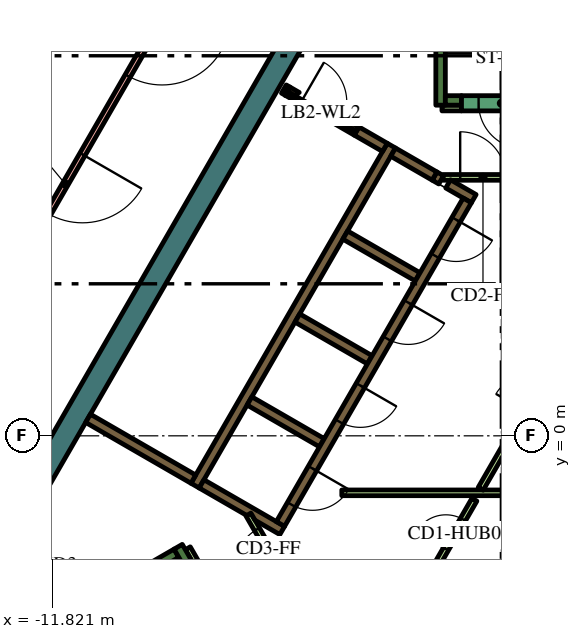
"""IFC4 building model, lengths in metres.
Left out: names, types, materials, properties, quantities, classifications, styles, units other than length and angle.
Written with IfcOpenShell. Run it as: python <this file> out.ifc"""

import sys

from ifc_helpers import new_model, si_unit, direction, frame, frame_2d, origin, place, context, subcontext, project, spatial, polyline, rectangle, outline, extrude, element, fill, save


model = new_model("IFC4")
c1 = context("Model", 3, precision=1e-05, world=origin(), true_north=direction((0.0, 1.0)))
c2 = subcontext(c1, "Body", "Model", "MODEL_VIEW")
j1 = project(units=[si_unit("LENGTHUNIT", "METRE"), si_unit("PLANEANGLEUNIT", "RADIAN")], contexts=[c1])
p1 = place(None, origin())
s1 = spatial("IfcSite", under=j1, at=p1, CompositionType="ELEMENT")
p2 = place(p1, origin())
s2 = spatial("IfcBuilding", under=s1, at=p2, CompositionType="ELEMENT")
p3 = place(p2, frame((0.0, 0.0, 321.6)))
s3 = spatial("IfcBuildingStorey", under=s2, at=p3, CompositionType="ELEMENT", Elevation=321.6)
p4 = place(p3, frame((-4.652, 11.842, 0.0), z_axis=(0.0, 0.0, 1.0), x_axis=(-0.500003640647, -0.866023301845, 0.0)))
e1 = element("IfcWall", 1, at=p4, inside=s3, PredefinedType="SOLIDWALL", context=c2, shape_type="SweptSolid", body=[
    extrude(rectangle(XDim=15.858, YDim=0.6, at=frame_2d((7.929, 0.0))), origin(), (0.0, 0.0, 1.0), 6.0),
])
p5 = place(p3, frame((-1.6, 8.7, 0.0), z_axis=(0.0, 0.0, 1.0), x_axis=(0.0, 1.0, 0.0)))
e2 = element("IfcWall", 2, at=p5, inside=s3, PredefinedType="SOLIDWALL", context=c2, shape_type="SweptSolid", body=[
    extrude(rectangle(XDim=7.05, YDim=0.25, at=frame_2d((3.525, 0.0))), origin(), (0.0, 0.0, 1.0), 6.0),
])
p6 = place(p3, frame((-1.475, 8.825, 0.0), z_axis=(0.0, 0.0, 1.0), x_axis=(1.0, 0.0, 0.0)))
e3 = element("IfcWall", 3, at=p6, inside=s3, PredefinedType="SOLIDWALL", context=c2, shape_type="SweptSolid", body=[
    extrude(rectangle(XDim=0.425, YDim=0.25, at=frame_2d((0.212, 0.0))), origin(), (0.0, 0.0, 1.0), 6.0),
])
p7 = place(p3, frame((-14.44, -6.49, 0.0), z_axis=(0.0, 0.0, 1.0), x_axis=(0.866022966069, 0.500004222222, 0.0)))
e4 = element("IfcWall", 4, at=p7, inside=s3, PredefinedType="SOLIDWALL", context=c2, shape_type="SweptSolid", body=[
    extrude(rectangle(XDim=6.8, YDim=0.25, at=frame_2d((3.4, 0.0))), origin(), (0.0, 0.0, 1.0), 6.0),
])
p8 = place(p3, frame((-8.168, -3.503, 0.0), z_axis=(0.0, 0.0, 1.0), x_axis=(-0.499952099219, 0.866053057547, 0.0)))
e5 = element("IfcWall", 5, at=p8, inside=s3, PredefinedType="SOLIDWALL", context=c2, shape_type="SweptSolid", body=[
    extrude(rectangle(XDim=0.675, YDim=0.25, at=frame_2d((0.337, 0.0))), origin(), (0.0, 0.0, 1.0), 6.0),
])
p9 = place(p3, frame((-8.06, -1.311, 0.0), z_axis=(0.0, 0.0, 1.0), x_axis=(0.50000273126, 0.866023826885, 0.0)))
e6 = element("IfcWall", 6, at=p9, inside=s3, PredefinedType="SOLIDWALL", context=c2, shape_type="SweptSolid", body=[
    extrude(rectangle(XDim=10.33, YDim=0.25, at=frame_2d((5.165, 0.0))), origin(), (0.0, 0.0, 1.0), 6.0),
])
p10 = place(p3, frame((-1.758, 6.835, 0.0), z_axis=(0.0, 0.0, 1.0), x_axis=(0.865982457891, -0.500074377092, 0.0)))
e7 = element("IfcWall", 7, at=p10, inside=s3, PredefinedType="SOLIDWALL", context=c2, shape_type="SweptSolid", body=[
    extrude(rectangle(XDim=0.2, YDim=0.25, at=frame_2d((0.1, 0.0))), origin(), (0.0, 0.0, 1.0), 6.0),
])
p11 = place(p3, frame((-1.76, 6.836, 0.0), z_axis=(0.0, 0.0, 1.0), x_axis=(-0.865952863304, 0.500125622755, 0.0)))
e8 = element("IfcWall", 8, at=p11, inside=s3, PredefinedType="SOLIDWALL", context=c2, shape_type="SweptSolid", body=[
    extrude(rectangle(XDim=1.258, YDim=0.25, at=frame_2d((0.629, 0.0))), origin(), (0.0, 0.0, 1.0), 6.0),
])
p12 = place(p3, frame((-0.728, 6.24, 0.0), z_axis=(0.0, 0.0, 1.0), x_axis=(-0.865955664968, 0.500120771724, 0.0)))
e9 = element("IfcWall", 9, at=p12, inside=s3, PredefinedType="SOLIDWALL", context=c2, shape_type="SweptSolid", body=[
    extrude(rectangle(XDim=0.778, YDim=0.25, at=frame_2d((0.389, 0.0))), origin(), (0.0, 0.0, 1.0), 6.0),
])
for number, where, z_axis, x_axis in (
    (10, (-2.204, 4.182, 0.0), (0.0, 0.0, 1.0), (-0.866, 0.5, 0.0)),
    (11, (-5.369, 3.1, 0.0), (0.0, 0.0, 1.0), (0.866, -0.5, 0.0)),
    (12, (-4.724, -0.182, 0.0), (0.0, 0.0, 1.0), (-0.866, 0.5, 0.0)),
):
    element("IfcWall", number, at=place(p3, frame(where, z_axis=z_axis, x_axis=x_axis)), inside=s3, PredefinedType="SOLIDWALL", context=c2, shape_type="SweptSolid", body=[
        extrude(rectangle(XDim=2.2, YDim=0.25, at=frame_2d((1.1, 0.0))), origin(), (0.0, 0.0, 1.0), 6.0),
    ])
p13 = place(p3, origin())
e13 = element("IfcWall", 13, at=p13, inside=s3, PredefinedType="SOLIDWALL", context=c2, shape_type="SweptSolid", body=[
    extrude(outline(polyline([(-5.922, -2.257), (-5.922, -2.257), (-5.705, -2.382), (-5.83, -2.598), (-6.483, -2.221), (-6.591, -2.033), (-6.591, -2.033), (-6.7, -2.096), (-7.952, -1.373), (-7.827, -1.156), (-5.922, -2.257)])), origin(), (0.0, 0.0, 1.0), 6.0),
])
p14 = place(p3, frame((-8.106, -1.14, 0.0), z_axis=(0.0, 0.0, 1.0), x_axis=(-0.866008981251, 0.500028443584, 0.0)))
e14 = element("IfcWall", 14, at=p14, inside=s3, PredefinedType="SOLIDWALL", context=c2, shape_type="SweptSolid", body=[
    extrude(rectangle(XDim=3.2, YDim=0.25, at=frame_2d((1.6, 0.0))), origin(), (0.0, 0.0, 1.0), 6.0),
])
p15 = place(p3, frame((-5.725, 9.125, 0.0), z_axis=(0.0, 0.0, 1.0), x_axis=(0.866185586049, -0.49972245349, 0.0)))
e15 = element("IfcWall", 15, at=p15, inside=s3, PredefinedType="SOLIDWALL", context=c2, shape_type="SweptSolid", body=[
    extrude(rectangle(XDim=0.11, YDim=0.25, at=frame_2d((0.055, 0.0))), origin(), (0.0, 0.0, 1.0), 6.0),
])
p16 = place(p3, frame((-3.066, 7.59, 0.0), z_axis=(0.0, 0.0, 1.0), x_axis=(-0.866081358704, 0.49990307071, 0.0)))
e16 = element("IfcWall", 16, at=p16, inside=s3, PredefinedType="SOLIDWALL", context=c2, shape_type="SweptSolid", body=[
    extrude(rectangle(XDim=0.858, YDim=0.25, at=frame_2d((0.429, 0.0))), origin(), (0.0, 0.0, 1.0), 6.0),
])
e17 = element("IfcWall", 17, at=p13, inside=s3, PredefinedType="SOLIDWALL", context=c2, shape_type="SweptSolid", body=[
    extrude(outline(polyline([(-3.748, 8.128), (-3.813, 8.015), (-4.027, 8.139), (-4.017, 8.156), (-4.008, 8.173), (-4.0, 8.192), (-3.995, 8.21), (-3.991, 8.23), (-3.99, 8.25), (-3.99, 8.268), (-3.748, 8.128)])), origin(), (0.0, 0.0, 1.0), 6.0),
])
e18 = element("IfcWall", 18, at=p13, inside=s3, PredefinedType="SOLIDWALL", context=c2, shape_type="SweptSolid", body=[
    extrude(outline(polyline([(-5.689, 8.96), (-5.69, 8.961), (-5.565, 9.177), (-5.319, 9.035), (-5.335, 9.026), (-5.351, 9.015), (-5.366, 9.002), (-5.379, 8.988), (-5.392, 8.972), (-5.402, 8.956), (-5.412, 8.939), (-5.629, 9.064), (-5.629, 9.064), (-5.689, 8.96)])), origin(), (0.0, 0.0, 1.0), 6.0),
])
for number, where, z_axis, x_axis in (
    (19, (-8.252, -2.958, 0.0), (0.0, 0.0, 1.0), (0.5, -0.866, 0.0)),
    (20, (-1.564, 8.625, 0.0), (0.0, 0.0, 1.0), (1.0, 0.0, 0.0)),
):
    element("IfcWall", number, at=place(p3, frame(where, z_axis=z_axis, x_axis=x_axis)), inside=s3, PredefinedType="PARTITIONING", context=c2, shape_type="SweptSolid", body=[
        extrude(rectangle(XDim=0.514, YDim=0.15, at=frame_2d((0.257, 0.0))), origin(), (0.0, 0.0, 1.0), 5.3),
    ])
p17 = place(p3, frame((-4.2, -1.5, 0.0), z_axis=(0.0, 0.0, 1.0), x_axis=(1.0, 0.0, 0.0)))
e21 = element("IfcWall", 21, at=p17, inside=s3, PredefinedType="PARTITIONING", context=c2, shape_type="SweptSolid", body=[
    extrude(rectangle(XDim=9.359, YDim=0.15, at=frame_2d((4.68, 0.0))), origin(), (0.0, 0.0, 1.0), 5.3),
])
p18 = place(p3, frame((-0.544, -1.393, 0.0), z_axis=(0.0, 0.0, 1.0), x_axis=(0.499928740635, 0.866066541489, 0.0)))
e22 = element("IfcWall", 22, at=p18, inside=s3, PredefinedType="PARTITIONING", context=c2, shape_type="SweptSolid", body=[
    extrude(rectangle(XDim=1.912, YDim=0.15, at=frame_2d((0.956, 0.0))), origin(), (0.0, 0.0, 1.0), 5.3),
])
p19 = place(p3, frame((-0.898, 6.194, 0.0), z_axis=(0.0, 0.0, 1.0), x_axis=(-0.499996202215, -0.866027596426, 0.0)))
e23 = element("IfcWall", 23, at=p19, inside=s3, PredefinedType="SOLIDWALL", context=c2, shape_type="SweptSolid", body=[
    extrude(rectangle(XDim=9.83, YDim=0.25, at=frame_2d((4.915, 0.0))), origin(), (0.0, 0.0, 1.0), 6.0),
])
p20 = place(p19, frame((0.585, 0.0, 0.0)))
e24 = element("IfcOpeningElement", 24, at=p20, cuts=e23, PredefinedType="OPENING", context=c2, shape_type="SweptSolid", body=[
    extrude(rectangle(XDim=1.1, YDim=2.1, at=frame_2d((0.55, 1.05))), frame((0.0, 0.135, 0.0), z_axis=(0.0, -1.0, 0.0), x_axis=(1.0, 0.0, 0.0)), (0.0, 0.0, 1.0), 0.27),
])
p21 = place(p19, frame((3.105, 0.0, 0.0)))
e25 = element("IfcOpeningElement", 25, at=p21, cuts=e23, PredefinedType="OPENING", context=c2, shape_type="SweptSolid", body=[
    extrude(rectangle(XDim=1.1, YDim=2.1, at=frame_2d((0.55, 1.05))), frame((0.0, 0.135, 0.0), z_axis=(0.0, -1.0, 0.0), x_axis=(1.0, 0.0, 0.0)), (0.0, 0.0, 1.0), 0.27),
])
p22 = place(p19, frame((5.625, 0.0, 0.0)))
e26 = element("IfcOpeningElement", 26, at=p22, cuts=e23, PredefinedType="OPENING", context=c2, shape_type="SweptSolid", body=[
    extrude(rectangle(XDim=1.1, YDim=2.1, at=frame_2d((0.55, 1.05))), frame((0.0, 0.135, 0.0), z_axis=(0.0, -1.0, 0.0), x_axis=(1.0, 0.0, 0.0)), (0.0, 0.0, 1.0), 0.27),
])
p23 = place(p19, frame((8.145, 0.0, 0.0)))
e27 = element("IfcOpeningElement", 27, at=p23, cuts=e23, PredefinedType="OPENING", context=c2, shape_type="SweptSolid", body=[
    extrude(rectangle(XDim=1.1, YDim=2.1, at=frame_2d((0.55, 1.05))), frame((0.0, 0.135, 0.0), z_axis=(0.0, -1.0, 0.0), x_axis=(1.0, 0.0, 0.0)), (0.0, 0.0, 1.0), 0.27),
])
p24 = place(p3, frame((1.05, 8.75, 0.0), z_axis=(0.0, 0.0, 1.0), x_axis=(-1.0, 0.0, 0.0)))
e28 = element("IfcWall", 28, at=p24, inside=s3, PredefinedType="SOLIDWALL", context=c2, shape_type="SweptSolid", body=[
    extrude(rectangle(XDim=2.1, YDim=0.4, at=frame_2d((1.05, 0.0))), origin(), (0.0, 0.0, 1.0), 6.0),
])
p25 = place(p24, frame((0.45, 0.0, 0.0)))
e29 = element("IfcOpeningElement", 29, at=p25, cuts=e28, PredefinedType="OPENING", context=c2, shape_type="SweptSolid", body=[
    extrude(rectangle(XDim=1.2, YDim=2.1, at=frame_2d((0.6, 1.05))), frame((0.0, 0.21, 0.0), z_axis=(0.0, -1.0, 0.0), x_axis=(1.0, 0.0, 0.0)), (0.0, 0.0, 1.0), 0.42),
])
p26 = place(p3, frame((-1.76, -3.498, 0.0), z_axis=(0.0, 0.0, 1.0), x_axis=(0.499977374825, 0.866038466041, 0.0)))
e30 = element("IfcWall", 30, at=p26, inside=s3, PredefinedType="PARTITIONING", context=c2, shape_type="SweptSolid", body=[
    extrude(rectangle(XDim=2.1, YDim=0.15, at=frame_2d((1.05, 0.0))), origin(), (0.0, 0.0, 1.0), 5.3),
])
p27 = place(p26, frame((0.6, 0.0, 0.0)))
e31 = element("IfcOpeningElement", 31, at=p27, cuts=e30, PredefinedType="OPENING", context=c2, shape_type="SweptSolid", body=[
    extrude(rectangle(XDim=0.9, YDim=2.1, at=frame_2d((0.45, 1.05))), frame((0.0, 0.085, 0.0), z_axis=(0.0, -1.0, 0.0), x_axis=(1.0, 0.0, 0.0)), (0.0, 0.0, 1.0), 0.17),
])
p28 = place(p3, frame((-1.534, 6.8, 0.0), z_axis=(0.0, 0.0, 1.0), x_axis=(1.0, 0.0, 0.0)))
e32 = element("IfcWall", 32, at=p28, inside=s3, PredefinedType="PARTITIONING", context=c2, shape_type="SweptSolid", body=[
    extrude(rectangle(XDim=2.1, YDim=0.15, at=frame_2d((1.05, 0.0))), origin(), (0.0, 0.0, 1.0), 5.3),
])
p29 = place(p28, frame((0.45, 0.0, 0.0)))
e33 = element("IfcOpeningElement", 33, at=p29, cuts=e32, PredefinedType="OPENING", context=c2, shape_type="SweptSolid", body=[
    extrude(rectangle(XDim=1.2, YDim=2.1, at=frame_2d((0.6, 1.05))), frame((0.0, 0.085, 0.0), z_axis=(0.0, -1.0, 0.0), x_axis=(1.0, 0.0, 0.0)), (0.0, 0.0, 1.0), 0.17),
])
p30 = place(p3, frame((-5.606, -3.89, 0.0), z_axis=(0.0, 0.0, 1.0), x_axis=(-0.500027713859, 0.866009402589, 0.0)))
e34 = element("IfcWall", 34, at=p30, inside=s3, PredefinedType="PARTITIONING", context=c2, shape_type="SweptSolid", body=[
    extrude(rectangle(XDim=2.1, YDim=0.15, at=frame_2d((1.05, 0.0))), origin(), (0.0, 0.0, 1.0), 5.3),
])
p31 = place(p30, frame((0.45, 0.0, 0.0)))
e35 = element("IfcOpeningElement", 35, at=p31, cuts=e34, PredefinedType="OPENING", context=c2, shape_type="SweptSolid", body=[
    extrude(rectangle(XDim=1.2, YDim=2.1, at=frame_2d((0.6, 1.05))), frame((0.0, 0.085, 0.0), z_axis=(0.0, -1.0, 0.0), x_axis=(1.0, 0.0, 0.0)), (0.0, 0.0, 1.0), 0.17),
])
p32 = place(p3, frame((-5.659, 9.012, 0.0), z_axis=(0.0, 0.0, 1.0), x_axis=(0.866009402589, -0.500027713859, 0.0)))
e36 = element("IfcWall", 36, at=p32, inside=s3, PredefinedType="PARTITIONING", context=c2, shape_type="SweptSolid", body=[
    extrude(rectangle(XDim=2.1, YDim=0.12, at=frame_2d((1.05, 0.0))), origin(), (0.0, 0.0, 1.0), 5.3),
])
p33 = place(p32, frame((0.45, 0.0, 0.0)))
e37 = element("IfcOpeningElement", 37, at=p33, cuts=e36, PredefinedType="OPENING", context=c2, shape_type="SweptSolid", body=[
    extrude(rectangle(XDim=1.2, YDim=2.1, at=frame_2d((0.6, 1.05))), frame((0.0, 0.07, 0.0), z_axis=(0.0, -1.0, 0.0), x_axis=(1.0, 0.0, 0.0)), (0.0, 0.0, 1.0), 0.14),
])
p34 = place(p3, frame((-3.984, 19.6, 0.0), z_axis=(0.0, 0.0, 1.0), x_axis=(-0.500001742692, -0.866024397638, 0.0)))
e38 = element("IfcWall", 38, at=p34, inside=s3, PredefinedType="PARTITIONING", context=c2, shape_type="SweptSolid", body=[
    extrude(rectangle(XDim=29.965, YDim=0.15, at=frame_2d((14.982, 0.0))), origin(), (0.0, 0.0, 1.0), 5.3),
])
p35 = place(p34, frame((14.082, 0.0, 0.0)))
e39 = element("IfcOpeningElement", 39, at=p35, cuts=e38, PredefinedType="OPENING", context=c2, shape_type="SweptSolid", body=[
    extrude(rectangle(XDim=1.8, YDim=2.1, at=frame_2d((0.9, 1.05))), frame((0.0, 0.085, 0.0), z_axis=(0.0, -1.0, 0.0), x_axis=(1.0, 0.0, 0.0)), (0.0, 0.0, 1.0), 0.17),
])
p36 = place(p34, frame((9.894, 0.0, 0.0)))
e40 = element("IfcOpeningElement", 40, at=p36, cuts=e38, PredefinedType="OPENING", context=c2, shape_type="SweptSolid", body=[
    extrude(rectangle(XDim=1.8, YDim=2.1, at=frame_2d((0.9, 1.05))), frame((0.0, 0.085, 0.0), z_axis=(0.0, -1.0, 0.0), x_axis=(1.0, 0.0, 0.0)), (0.0, 0.0, 1.0), 0.17),
])
p37 = place(p20, origin())
e41 = element("IfcDoor", 41, at=p37, inside=s3, OperationType="DOUBLE_DOOR_SLIDING", PredefinedType="DOOR", context=c2, shape_type="SweptSolid", body=[
    extrude(rectangle(XDim=1.1, YDim=2.1, at=frame_2d((0.55, 1.05))), frame((0.0, 0.025, 0.0), z_axis=(0.0, -1.0, 0.0), x_axis=(1.0, 0.0, 0.0)), (0.0, 0.0, 1.0), 0.05),
])
fill(e24, e41)
p38 = place(p21, origin())
e42 = element("IfcDoor", 42, at=p38, inside=s3, OperationType="DOUBLE_DOOR_SLIDING", PredefinedType="DOOR", context=c2, shape_type="SweptSolid", body=[
    extrude(rectangle(XDim=1.1, YDim=2.1, at=frame_2d((0.55, 1.05))), frame((0.0, 0.025, 0.0), z_axis=(0.0, -1.0, 0.0), x_axis=(1.0, 0.0, 0.0)), (0.0, 0.0, 1.0), 0.05),
])
fill(e25, e42)
p39 = place(p22, origin())
e43 = element("IfcDoor", 43, at=p39, inside=s3, OperationType="DOUBLE_DOOR_SLIDING", PredefinedType="DOOR", context=c2, shape_type="SweptSolid", body=[
    extrude(rectangle(XDim=1.1, YDim=2.1, at=frame_2d((0.55, 1.05))), frame((0.0, 0.025, 0.0), z_axis=(0.0, -1.0, 0.0), x_axis=(1.0, 0.0, 0.0)), (0.0, 0.0, 1.0), 0.05),
])
fill(e26, e43)
p40 = place(p23, origin())
e44 = element("IfcDoor", 44, at=p40, inside=s3, OperationType="DOUBLE_DOOR_SLIDING", PredefinedType="DOOR", context=c2, shape_type="SweptSolid", body=[
    extrude(rectangle(XDim=1.1, YDim=2.1, at=frame_2d((0.55, 1.05))), frame((0.0, 0.025, 0.0), z_axis=(0.0, -1.0, 0.0), x_axis=(1.0, 0.0, 0.0)), (0.0, 0.0, 1.0), 0.05),
])
fill(e27, e44)
p41 = place(p25, origin())
e45 = element("IfcDoor", 45, at=p41, inside=s3, OperationType="SINGLE_SWING_LEFT", PredefinedType="DOOR", context=c2, shape_type="SweptSolid", body=[
    extrude(rectangle(XDim=1.2, YDim=2.1, at=frame_2d((0.6, 1.05))), frame((0.0, 0.025, 0.0), z_axis=(0.0, -1.0, 0.0), x_axis=(1.0, 0.0, 0.0)), (0.0, 0.0, 1.0), 0.05),
])
fill(e29, e45)
p42 = place(p27, origin())
e46 = element("IfcDoor", 46, at=p42, inside=s3, OperationType="SINGLE_SWING_LEFT", PredefinedType="DOOR", context=c2, shape_type="SweptSolid", body=[
    extrude(rectangle(XDim=0.9, YDim=2.1, at=frame_2d((0.45, 1.05))), frame((0.0, 0.025, 0.0), z_axis=(0.0, -1.0, 0.0), x_axis=(1.0, 0.0, 0.0)), (0.0, 0.0, 1.0), 0.05),
])
fill(e31, e46)
p43 = place(p29, origin())
e47 = element("IfcDoor", 47, at=p43, inside=s3, OperationType="SINGLE_SWING_LEFT", PredefinedType="DOOR", context=c2, shape_type="SweptSolid", body=[
    extrude(rectangle(XDim=1.2, YDim=2.1, at=frame_2d((0.6, 1.05))), frame((0.0, 0.025, 0.0), z_axis=(0.0, -1.0, 0.0), x_axis=(1.0, 0.0, 0.0)), (0.0, 0.0, 1.0), 0.05),
])
fill(e33, e47)
p44 = place(p31, origin())
e48 = element("IfcDoor", 48, at=p44, inside=s3, OperationType="SINGLE_SWING_LEFT", PredefinedType="DOOR", context=c2, shape_type="SweptSolid", body=[
    extrude(rectangle(XDim=1.2, YDim=2.1, at=frame_2d((0.6, 1.05))), frame((0.0, 0.025, 0.0), z_axis=(0.0, -1.0, 0.0), x_axis=(1.0, 0.0, 0.0)), (0.0, 0.0, 1.0), 0.05),
])
fill(e35, e48)
p45 = place(p33, origin())
e49 = element("IfcDoor", 49, at=p45, inside=s3, OperationType="SINGLE_SWING_LEFT", PredefinedType="DOOR", context=c2, shape_type="SweptSolid", body=[
    extrude(rectangle(XDim=1.2, YDim=2.1, at=frame_2d((0.6, 1.05))), frame((0.0, 0.025, 0.0), z_axis=(0.0, -1.0, 0.0), x_axis=(1.0, 0.0, 0.0)), (0.0, 0.0, 1.0), 0.05),
])
fill(e37, e49)
p46 = place(p35, origin())
e50 = element("IfcDoor", 50, at=p46, inside=s3, OperationType="DOUBLE_DOOR_SINGLE_SWING", PredefinedType="DOOR", context=c2, shape_type="SweptSolid", body=[
    extrude(rectangle(XDim=1.8, YDim=2.1, at=frame_2d((0.9, 1.05))), frame((0.0, 0.025, 0.0), z_axis=(0.0, -1.0, 0.0), x_axis=(1.0, 0.0, 0.0)), (0.0, 0.0, 1.0), 0.05),
])
fill(e39, e50)
p47 = place(p36, origin())
e51 = element("IfcDoor", 51, at=p47, inside=s3, OperationType="DOUBLE_DOOR_SINGLE_SWING", PredefinedType="DOOR", context=c2, shape_type="SweptSolid", body=[
    extrude(rectangle(XDim=1.8, YDim=2.1, at=frame_2d((0.9, 1.05))), frame((0.0, 0.025, 0.0), z_axis=(0.0, -1.0, 0.0), x_axis=(1.0, 0.0, 0.0)), (0.0, 0.0, 1.0), 0.05),
])
fill(e40, e51)
save(model, sys.argv[1])
